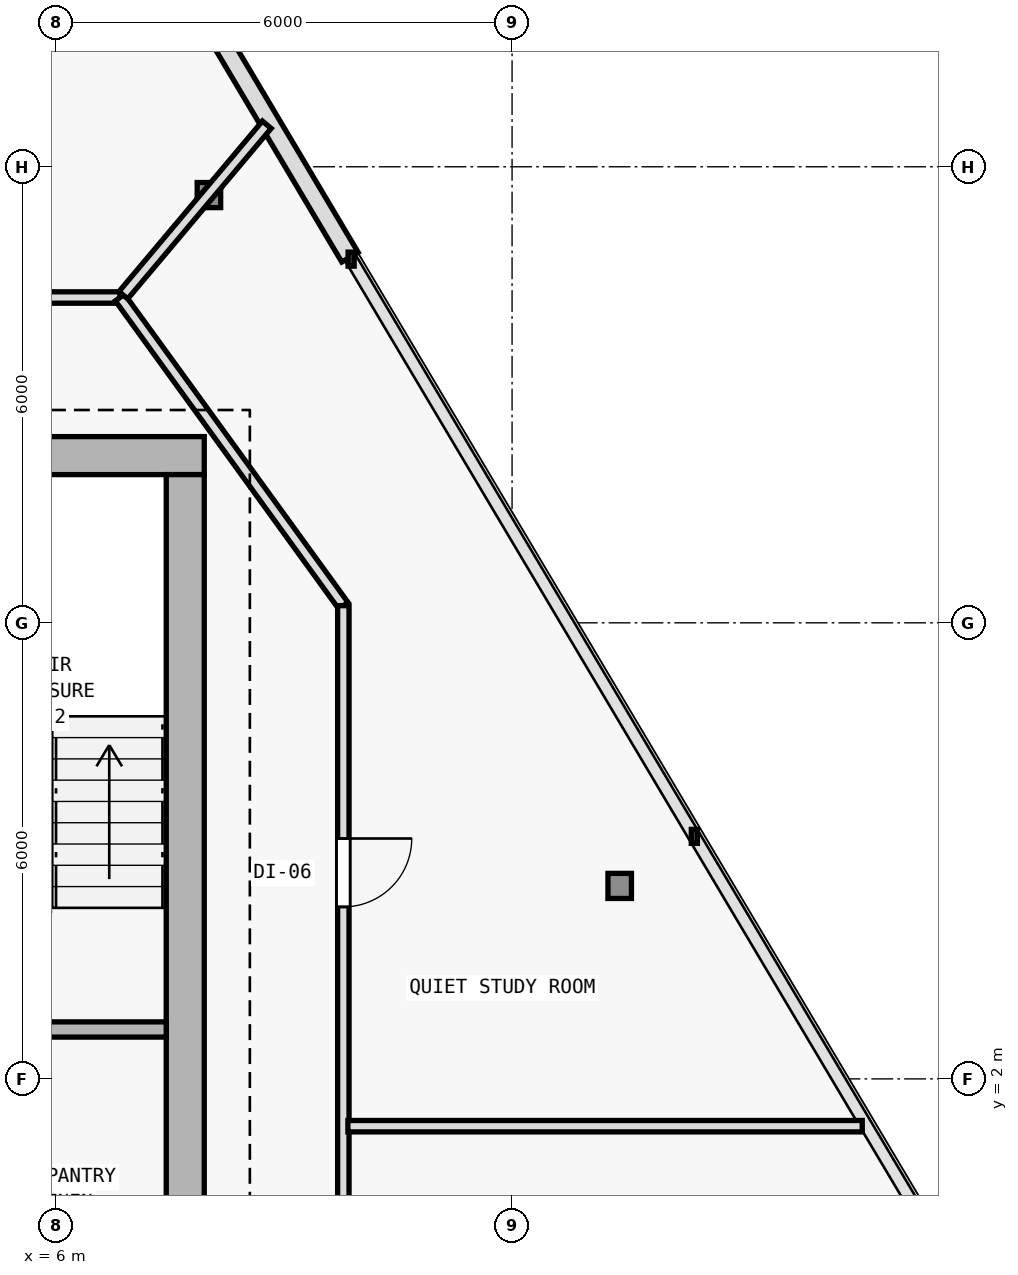
"""IFC4 building model, lengths in metres.
Left out: names, types, materials, properties, quantities, classifications, styles, units other than length and angle.
Written with IfcOpenShell. Run it as: python <this file> out.ifc"""

import sys

from ifc_helpers import new_model, si_unit, direction, frame, frame_2d, origin, origin_2d, place, context, subcontext, project, spatial, rectangle, i_section, extrude, element, fill, save


model = new_model("IFC4")
c1 = context("Model", 3, precision=1e-05, world=origin(), true_north=direction((0.0, 1.0)))
c2 = subcontext(c1, "Body", "Model", "MODEL_VIEW")
j1 = project(units=[si_unit("LENGTHUNIT", "METRE"), si_unit("PLANEANGLEUNIT", "RADIAN")], contexts=[c1])
p1 = place(None, origin())
s1 = spatial("IfcSite", under=j1, at=p1, CompositionType="ELEMENT")
p2 = place(p1, origin())
s2 = spatial("IfcBuilding", under=s1, at=p2, CompositionType="ELEMENT")
p3 = place(p2, frame((0.0, 0.0, 279.6)))
s3 = spatial("IfcBuildingStorey", under=s2, at=p3, CompositionType="ELEMENT", Elevation=279.6)
for number, where, z_axis, x_axis in (
    (1, (7.7, 10.2, 0.0), (0.0, 0.0, 1.0), (1.0, 0.0, 0.0)),
    (2, (7.7, 0.4, 0.0), (0.0, 0.0, 1.0), (1.0, 0.0, 0.0)),
):
    element("IfcColumn", number, at=place(p3, frame(where, z_axis=z_axis, x_axis=x_axis)), inside=s3, PredefinedType="COLUMN", context=c2, shape_type="SweptSolid", body=[
        extrude(i_section(OverallWidth=0.374, OverallDepth=0.372, WebThickness=0.012, FlangeThickness=0.02, FilletRadius=0.015, at=origin_2d()), origin(), (0.0, 0.0, 1.0), 3.6),
    ])
p4 = place(p3, frame((13.416, 4.539, 0.005), z_axis=(-0.018974011572, 0.009589016601, 0.999773993283), x_axis=(-0.451048184688, -0.89249959949, 0.0)))
e3 = element("IfcColumn", 3, at=p4, inside=s3, PredefinedType="COLUMN", context=c2, shape_type="SweptSolid", body=[
    extrude(i_section(OverallWidth=0.309, OverallDepth=0.33, WebThickness=0.011, FlangeThickness=0.019, FilletRadius=0.027, at=origin_2d()), origin(), (0.0, 0.0, 1.0), 3.59),
])
p5 = place(p3, frame((8.011, 13.628, 0.005), z_axis=(-0.011767052893, -0.002584670578, 0.999927425339), x_axis=(0.214538664031, -0.976715496773, 0.0)))
e4 = element("IfcColumn", 4, at=p5, inside=s3, PredefinedType="COLUMN", context=c2, shape_type="SweptSolid", body=[
    extrude(i_section(OverallWidth=0.309, OverallDepth=0.33, WebThickness=0.011, FlangeThickness=0.019, FilletRadius=0.027, at=origin_2d()), origin(), (0.0, 0.0, 1.0), 3.589),
])
p6 = place(p3, frame((5.091, 20.842, 0.0), z_axis=(0.0, 0.0, 1.0), x_axis=(0.511095217069, -0.859524100354, 0.0)))
e5 = element("IfcWall", 5, at=p6, inside=s3, PredefinedType="SOLIDWALL", context=c2, shape_type="SweptSolid", body=[
    extrude(rectangle(XDim=9.344, YDim=0.25, at=frame_2d((4.672, 0.0))), origin(), (0.0, 0.0, 1.0), 3.35),
])
p7 = place(p6, frame((3.922, 0.0, 0.62)))
e6 = element("IfcOpeningElement", 6, at=p7, cuts=e5, PredefinedType="OPENING", context=c2, shape_type="SweptSolid", body=[
    extrude(rectangle(XDim=1.5, YDim=2.0, at=frame_2d((0.75, 1.0))), frame((0.0, 0.135, 0.0), z_axis=(0.0, -1.0, 0.0), x_axis=(1.0, 0.0, 0.0)), (0.0, 0.0, 1.0), 0.27),
])
p8 = place(p3, frame((7.95, 10.2, 0.0), z_axis=(0.0, 0.0, 1.0), x_axis=(-1.0, 0.0, 0.0)))
e7 = element("IfcWall", 7, at=p8, inside=s3, PredefinedType="SHEAR", context=c2, shape_type="SweptSolid", body=[
    extrude(rectangle(XDim=15.9, YDim=0.5, at=frame_2d((7.95, 0.0))), origin(), (0.0, 0.0, 1.0), 3.35),
])
p9 = place(p8, frame((4.4, 0.0, 0.0)))
e8 = element("IfcOpeningElement", 8, at=p9, cuts=e7, PredefinedType="OPENING", context=c2, shape_type="SweptSolid", body=[
    extrude(rectangle(XDim=1.1, YDim=2.15, at=frame_2d((0.55, 1.075))), frame((0.0, 0.26, 0.0), z_axis=(0.0, -1.0, 0.0), x_axis=(1.0, 0.0, 0.0)), (0.0, 0.0, 1.0), 0.52),
])
p10 = place(p3, frame((7.7, 9.95, 0.0), z_axis=(0.0, 0.0, 1.0), x_axis=(0.0, -1.0, 0.0)))
e9 = element("IfcWall", 9, at=p10, inside=s3, PredefinedType="SHEAR", context=c2, shape_type="SweptSolid", body=[
    extrude(rectangle(XDim=19.1, YDim=0.5, at=frame_2d((9.55, 0.0))), origin(), (0.0, 0.0, 1.0), 3.35),
])
p11 = place(p3, frame((4.05, 2.65, 0.0), z_axis=(0.0, 0.0, 1.0), x_axis=(1.0, 0.0, 0.0)))
e10 = element("IfcWall", 10, at=p11, inside=s3, PredefinedType="SOLIDWALL", context=c2, shape_type="SweptSolid", body=[
    extrude(rectangle(XDim=3.4, YDim=0.2, at=frame_2d((1.7, 0.0))), origin(), (0.0, 0.0, 1.0), 3.35),
])
p12 = place(p3, frame((-6.841, 12.28, 0.0), z_axis=(0.0, 0.0, 1.0), x_axis=(1.0, 0.0, 0.0)))
e11 = element("IfcWall", 11, at=p12, inside=s3, PredefinedType="PARTITIONING", context=c2, shape_type="SweptSolid", body=[
    extrude(rectangle(XDim=13.682, YDim=0.15, at=frame_2d((6.841, 0.0))), origin(), (0.0, 0.0, 1.0), 3.015),
])
p13 = place(p12, frame((10.935, 0.0, 0.0)))
e12 = element("IfcOpeningElement", 12, at=p13, cuts=e11, PredefinedType="OPENING", context=c2, shape_type="SweptSolid", body=[
    extrude(rectangle(XDim=0.9, YDim=2.1, at=frame_2d((0.45, 1.05))), frame((0.0, 0.085, 0.0), z_axis=(0.0, -1.0, 0.0), x_axis=(1.0, 0.0, 0.0)), (0.0, 0.0, 1.0), 0.17),
])
p14 = place(p12, frame((4.693, 0.0, 0.0)))
e13 = element("IfcOpeningElement", 13, at=p14, cuts=e11, PredefinedType="OPENING", context=c2, shape_type="SweptSolid", body=[
    extrude(rectangle(XDim=0.9, YDim=2.1, at=frame_2d((0.45, 1.05))), frame((0.0, 0.085, 0.0), z_axis=(0.0, -1.0, 0.0), x_axis=(1.0, 0.0, 0.0)), (0.0, 0.0, 1.0), 0.17),
])
p15 = place(p3, frame((6.841, 12.28, 0.0), z_axis=(0.0, 0.0, 1.0), x_axis=(0.586956386413, -0.809618552436, 0.0)))
e14 = element("IfcWall", 14, at=p15, inside=s3, PredefinedType="PARTITIONING", context=c2, shape_type="SweptSolid", body=[
    extrude(rectangle(XDim=5.008, YDim=0.15, at=frame_2d((2.504, 0.0))), origin(), (0.0, 0.0, 1.0), 2.725),
])
p16 = place(p3, frame((9.78, 8.226, 0.0), z_axis=(0.0, 0.0, 1.0), x_axis=(0.0, -1.0, 0.0)))
e15 = element("IfcWall", 15, at=p16, inside=s3, PredefinedType="PARTITIONING", context=c2, shape_type="SweptSolid", body=[
    extrude(rectangle(XDim=19.706, YDim=0.15, at=frame_2d((9.853, 0.0))), origin(), (0.0, 0.0, 1.0), 2.725),
])
p17 = place(p16, frame((17.352, 0.0, 0.0)))
e16 = element("IfcOpeningElement", 16, at=p17, cuts=e15, PredefinedType="OPENING", context=c2, shape_type="SweptSolid", body=[
    extrude(rectangle(XDim=0.9, YDim=2.1, at=frame_2d((0.45, 1.05))), frame((0.0, 0.085, 0.0), z_axis=(0.0, -1.0, 0.0), x_axis=(1.0, 0.0, 0.0)), (0.0, 0.0, 1.0), 0.17),
])
p18 = place(p16, frame((14.828, 0.0, 0.0)))
e17 = element("IfcOpeningElement", 17, at=p18, cuts=e15, PredefinedType="OPENING", context=c2, shape_type="SweptSolid", body=[
    extrude(rectangle(XDim=0.85, YDim=2.1, at=frame_2d((0.425, 1.05))), frame((0.0, 0.085, 0.0), z_axis=(0.0, -1.0, 0.0), x_axis=(1.0, 0.0, 0.0)), (0.0, 0.0, 1.0), 0.17),
])
p19 = place(p16, frame((13.159, 0.0, 0.0)))
e18 = element("IfcOpeningElement", 18, at=p19, cuts=e15, PredefinedType="OPENING", context=c2, shape_type="SweptSolid", body=[
    extrude(rectangle(XDim=0.85, YDim=2.1, at=frame_2d((0.425, 1.05))), frame((0.0, 0.085, 0.0), z_axis=(0.0, -1.0, 0.0), x_axis=(1.0, 0.0, 0.0)), (0.0, 0.0, 1.0), 0.17),
])
p20 = place(p16, frame((9.343, 0.0, 0.0)))
e19 = element("IfcOpeningElement", 19, at=p20, cuts=e15, PredefinedType="OPENING", context=c2, shape_type="SweptSolid", body=[
    extrude(rectangle(XDim=0.9, YDim=2.1, at=frame_2d((0.45, 1.05))), frame((0.0, 0.085, 0.0), z_axis=(0.0, -1.0, 0.0), x_axis=(1.0, 0.0, 0.0)), (0.0, 0.0, 1.0), 0.17),
])
p21 = place(p16, frame((3.063, 0.0, 0.0)))
e20 = element("IfcOpeningElement", 20, at=p21, cuts=e15, PredefinedType="OPENING", context=c2, shape_type="SweptSolid", body=[
    extrude(rectangle(XDim=0.9, YDim=2.1, at=frame_2d((0.45, 1.05))), frame((0.0, 0.085, 0.0), z_axis=(0.0, -1.0, 0.0), x_axis=(1.0, 0.0, 0.0)), (0.0, 0.0, 1.0), 0.17),
])
p22 = place(p3, frame((6.886, 12.31, 0.0), z_axis=(0.0, 0.0, 1.0), x_axis=(0.64386381785, 0.765140107473, 0.0)))
e21 = element("IfcWall", 21, at=p22, inside=s3, PredefinedType="PARTITIONING", context=c2, shape_type="SweptSolid", body=[
    extrude(rectangle(XDim=2.931, YDim=0.15, at=frame_2d((1.466, 0.0))), origin(), (0.0, 0.0, 1.0), 3.015),
])
p23 = place(p3, frame((9.84, 1.378, 0.0), z_axis=(0.0, 0.0, 1.0), x_axis=(1.0, 0.0, 0.0)))
e22 = element("IfcWall", 22, at=p23, inside=s3, PredefinedType="PARTITIONING", context=c2, shape_type="SweptSolid", body=[
    extrude(rectangle(XDim=6.767, YDim=0.15, at=frame_2d((3.384, 0.0))), origin(), (0.0, 0.0, 1.0), 3.015),
])
p24 = place(p21, origin())
e23 = element("IfcDoor", 23, at=p24, inside=s3, OperationType="SINGLE_SWING_LEFT", PredefinedType="DOOR", context=c2, shape_type="SweptSolid", body=[
    extrude(rectangle(XDim=0.9, YDim=2.1, at=frame_2d((0.45, 1.05))), frame((0.0, 0.025, 0.0), z_axis=(0.0, -1.0, 0.0), x_axis=(1.0, 0.0, 0.0)), (0.0, 0.0, 1.0), 0.05),
])
fill(e20, e23)
save(model, sys.argv[1])
